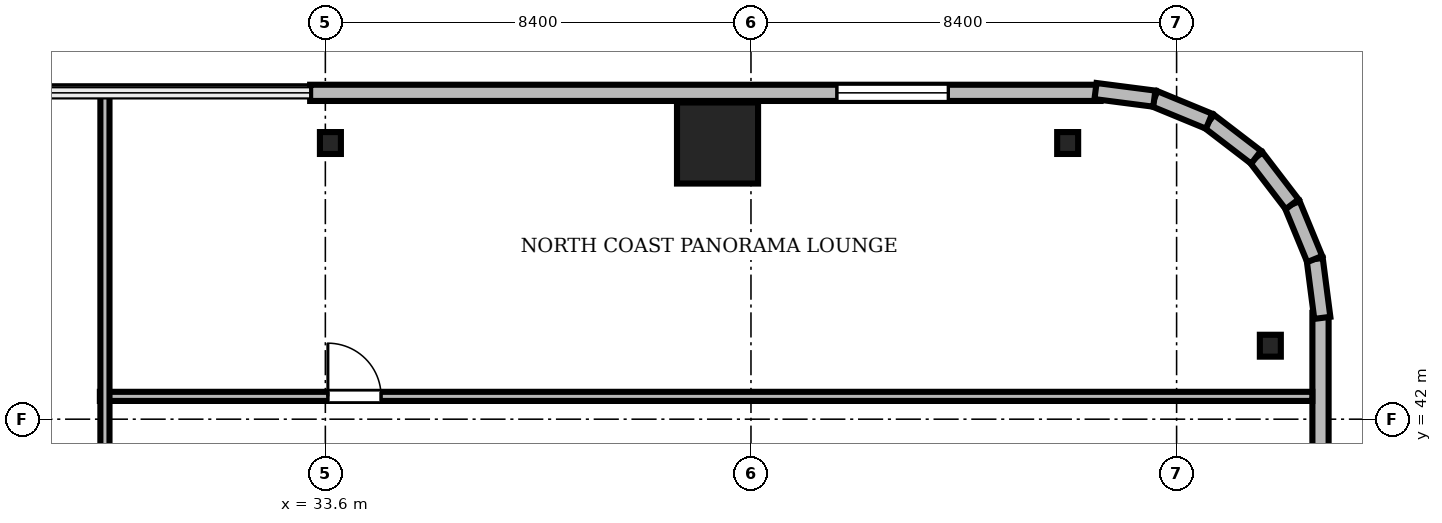
"""IFC4 building model, lengths in metres.
Left out: names, types, materials, properties, quantities, classifications, styles, units other than length and angle.
Written with IfcOpenShell. Run it as: python <this file> out.ifc"""

import sys

from ifc_helpers import new_model, si_unit, direction, frame, frame_2d, origin, origin_2d, place, context, subcontext, project, spatial, rectangle, i_section, extrude, source, transform, mapped, element, fill, save


model = new_model("IFC4")
c1 = context("Model", 3, precision=1e-05, world=origin(), true_north=direction((0.0, 1.0)))
c2 = subcontext(c1, "Body", "Model", "MODEL_VIEW")
j1 = project(units=[si_unit("LENGTHUNIT", "METRE"), si_unit("PLANEANGLEUNIT", "RADIAN")], contexts=[c1])
p1 = place(None, origin())
s1 = spatial("IfcSite", under=j1, at=p1, CompositionType="ELEMENT")
p2 = place(p1, origin())
s2 = spatial("IfcBuilding", under=s1, at=p2, CompositionType="ELEMENT")
p3 = place(p2, frame((0.0, 0.0, 129.8)))
s3 = spatial("IfcBuildingStorey", under=s2, at=p3, CompositionType="ELEMENT", Elevation=129.8)
m1 = source(origin(), c2, "Body", "SweptSolid", [
    extrude(rectangle(XDim=1.6, YDim=1.6, at=origin_2d()), origin(), (0.0, 0.0, 1.0), 3.46),
])
p4 = place(p3, frame((41.34, 47.45, 0.0), z_axis=(0.0, 0.0, 1.0), x_axis=(1.0, 0.0, 0.0)))
e1 = element("IfcColumn", 1, at=p4, inside=s3, PredefinedType="COLUMN", context=c2, shape_type="MappedRepresentation", body=[
    mapped(m1, transform((0.0, 0.0, 0.0), scale=1.0)),
])
m2 = source(origin(), c2, "Body", "SweptSolid", [
    extrude(i_section(OverallWidth=0.414, OverallDepth=0.432, WebThickness=0.026, FlangeThickness=0.04, FilletRadius=0.015, at=origin_2d()), origin(), (0.0, 0.0, 1.0), 3.46),
])
for number, where, z_axis, x_axis in (
    (2, (52.25, 43.45, 0.0), (0.0, 0.0, 1.0), (1.0, 0.0, 0.0)),
    (3, (48.25, 47.45, 0.0), (0.0, 0.0, 1.0), (1.0, 0.0, 0.0)),
    (4, (33.7, 47.45, 0.0), (0.0, 0.0, 1.0), (1.0, 0.0, 0.0)),
):
    element("IfcColumn", number, at=place(p3, frame(where, z_axis=z_axis, x_axis=x_axis)), inside=s3, PredefinedType="COLUMN", context=c2, shape_type="MappedRepresentation", body=[
        mapped(m2, transform((0.0, 0.0, 0.0), scale=1.0)),
    ])
m3 = source(origin(), c2, "Body", "SweptSolid", [
    extrude(rectangle(XDim=15.6, YDim=0.32, at=frame_2d((7.8, 0.0))), origin(), (0.0, 0.0, 1.0), 3.46),
])
p5 = place(p3, frame((48.9, 48.44, 0.0), z_axis=(0.0, 0.0, 1.0), x_axis=(-1.0, 0.0, 0.0)))
e5 = element("IfcWall", 5, at=p5, inside=s3, PredefinedType="SOLIDWALL", context=c2, shape_type="MappedRepresentation", body=[
    mapped(m3, transform((0.0, 0.0, 0.0), scale=1.0)),
])
m4 = source(origin(), c2, "Body", "SweptSolid", [
    extrude(rectangle(XDim=2.2, YDim=2.4, at=frame_2d((1.1, 1.2))), frame((0.0, 0.17, 0.0), z_axis=(0.0, -1.0, 0.0), x_axis=(1.0, 0.0, 0.0)), (0.0, 0.0, 1.0), 0.34),
])
p6 = place(p5, frame((3.005, 0.0, 0.72)))
e6 = element("IfcOpeningElement", 6, at=p6, cuts=e5, PredefinedType="OPENING", context=c2, shape_type="MappedRepresentation", body=[
    mapped(m4, transform((0.0, 0.0, 0.0), scale=1.0)),
])
m5 = source(origin(), c2, "Body", "SweptSolid", [
    extrude(rectangle(XDim=15.6, YDim=0.32, at=frame_2d((7.8, 0.0))), origin(), (0.0, 0.0, 1.0), 3.46),
])
p7 = place(p3, frame((53.24, 28.5, 0.0), z_axis=(0.0, 0.0, 1.0), x_axis=(0.0, 1.0, 0.0)))
e7 = element("IfcWall", 7, at=p7, inside=s3, PredefinedType="SOLIDWALL", context=c2, shape_type="MappedRepresentation", body=[
    mapped(m5, transform((0.0, 0.0, 0.0), scale=1.0)),
])
p8 = place(p7, frame((10.395, 0.0, 0.72)))
e8 = element("IfcOpeningElement", 8, at=p8, cuts=e7, PredefinedType="OPENING", context=c2, shape_type="MappedRepresentation", body=[
    mapped(m4, transform((0.0, 0.0, 0.0), scale=1.0)),
])
m6 = source(origin(), c2, "Body", "SweptSolid", [
    extrude(rectangle(XDim=1.17, YDim=0.32, at=frame_2d((0.585, 0.0))), origin(), (0.0, 0.0, 1.0), 3.46),
])
p9 = place(p3, frame((53.276, 44.0, 0.0), z_axis=(0.0, 0.0, 1.0), x_axis=(-0.128295670475, 0.991735963317, 0.0)))
e9 = element("IfcWall", 9, at=p9, inside=s3, PredefinedType="SOLIDWALL", context=c2, shape_type="MappedRepresentation", body=[
    mapped(m6, transform((0.0, 0.0, 0.0), scale=1.0)),
])
m7 = source(origin(), c2, "Body", "SweptSolid", [
    extrude(rectangle(XDim=1.169, YDim=0.32, at=frame_2d((0.584, 0.0))), origin(), (0.0, 0.0, 1.0), 3.46),
])
p10 = place(p3, frame((53.125, 45.16, 0.0), z_axis=(0.0, 0.0, 1.0), x_axis=(-0.381054331552, 0.924552646638, 0.0)))
e10 = element("IfcWall", 10, at=p10, inside=s3, PredefinedType="SOLIDWALL", context=c2, shape_type="MappedRepresentation", body=[
    mapped(m7, transform((0.0, 0.0, 0.0), scale=1.0)),
])
m8 = source(origin(), c2, "Body", "SweptSolid", [
    extrude(rectangle(XDim=1.169, YDim=0.32, at=frame_2d((0.584, 0.0))), origin(), (0.0, 0.0, 1.0), 3.46),
])
p11 = place(p3, frame((52.68, 46.241, 0.0), z_axis=(0.0, 0.0, 1.0), x_axis=(-0.608387696831, 0.793639975269, 0.0)))
e11 = element("IfcWall", 11, at=p11, inside=s3, PredefinedType="SOLIDWALL", context=c2, shape_type="MappedRepresentation", body=[
    mapped(m8, transform((0.0, 0.0, 0.0), scale=1.0)),
])
m9 = source(origin(), c2, "Body", "SweptSolid", [
    extrude(rectangle(XDim=1.169, YDim=0.32, at=frame_2d((0.584, 0.0))), origin(), (0.0, 0.0, 1.0), 3.46),
])
p12 = place(p3, frame((51.969, 47.169, 0.0), z_axis=(0.0, 0.0, 1.0), x_axis=(-0.793663520347, 0.608356981114, 0.0)))
e12 = element("IfcWall", 12, at=p12, inside=s3, PredefinedType="SOLIDWALL", context=c2, shape_type="MappedRepresentation", body=[
    mapped(m9, transform((0.0, 0.0, 0.0), scale=1.0)),
])
p13 = place(p3, frame((51.041, 47.88, 0.0), z_axis=(0.0, 0.0, 1.0), x_axis=(-0.924552646638, 0.381054331552, 0.0)))
e13 = element("IfcWall", 13, at=p13, inside=s3, PredefinedType="SOLIDWALL", context=c2, shape_type="MappedRepresentation", body=[
    mapped(m7, transform((0.0, 0.0, 0.0), scale=1.0)),
])
p14 = place(p3, frame((49.96, 48.325, 0.0), z_axis=(0.0, 0.0, 1.0), x_axis=(-0.991735963317, 0.128295670475, 0.0)))
e14 = element("IfcWall", 14, at=p14, inside=s3, PredefinedType="SOLIDWALL", context=c2, shape_type="MappedRepresentation", body=[
    mapped(m6, transform((0.0, 0.0, 0.0), scale=1.0)),
])
m10 = source(origin(), c2, "Body", "SweptSolid", [
    extrude(rectangle(XDim=23.928, YDim=0.18, at=frame_2d((11.964, 0.0))), origin(), (0.0, 0.0, 1.0), 2.702),
])
p15 = place(p3, frame((29.15, 42.45, 0.0), z_axis=(0.0, 0.0, 1.0), x_axis=(1.0, 0.0, 0.0)))
e15 = element("IfcWall", 15, at=p15, inside=s3, PredefinedType="PARTITIONING", context=c2, shape_type="MappedRepresentation", body=[
    mapped(m10, transform((0.0, 0.0, 0.0), scale=1.0)),
])
m11 = source(origin(), c2, "Body", "SweptSolid", [
    extrude(rectangle(XDim=1.05, YDim=2.2, at=frame_2d((0.525, 1.1))), frame((0.0, 0.1, 0.0), z_axis=(0.0, -1.0, 0.0), x_axis=(1.0, 0.0, 0.0)), (0.0, 0.0, 1.0), 0.2),
])
p16 = place(p15, frame((4.5, 0.0, 0.0)))
e16 = element("IfcOpeningElement", 16, at=p16, cuts=e15, PredefinedType="OPENING", context=c2, shape_type="MappedRepresentation", body=[
    mapped(m11, transform((0.0, 0.0, 0.0), scale=1.0)),
])
m12 = source(origin(), c2, "Body", "SweptSolid", [
    extrude(rectangle(XDim=11.45, YDim=0.18, at=frame_2d((5.725, 0.0))), origin(), (0.0, 0.0, 1.0), 2.702),
])
p17 = place(p3, frame((29.25, 37.02, 0.0), z_axis=(0.0, 0.0, 1.0), x_axis=(0.0, 1.0, 0.0)))
e17 = element("IfcWall", 17, at=p17, inside=s3, PredefinedType="PARTITIONING", context=c2, shape_type="MappedRepresentation", body=[
    mapped(m12, transform((0.0, 0.0, 0.0), scale=1.0)),
])
m13 = source(origin(), c2, "Body", "SweptSolid", [
    extrude(rectangle(XDim=2.2, YDim=2.4, at=frame_2d((1.1, 1.2))), frame((0.0, 0.03, 0.0), z_axis=(0.0, -1.0, 0.0), x_axis=(1.0, 0.0, 0.0)), (0.0, 0.0, 1.0), 0.06),
])
p18 = place(p6, origin())
e18 = element("IfcWindow", 18, at=p18, inside=s3, PartitioningType="SINGLE_PANEL", PredefinedType="WINDOW", context=c2, shape_type="MappedRepresentation", body=[
    mapped(m13, transform((0.0, 0.0, 0.0), scale=1.0)),
])
fill(e6, e18)
m14 = source(origin(), c2, "Body", "SweptSolid", [
    extrude(rectangle(XDim=1.05, YDim=2.2, at=frame_2d((0.525, 1.1))), frame((0.0, 0.025, 0.0), z_axis=(0.0, -1.0, 0.0), x_axis=(1.0, 0.0, 0.0)), (0.0, 0.0, 1.0), 0.05),
])
p19 = place(p16, origin())
e19 = element("IfcDoor", 19, at=p19, inside=s3, OperationType="SINGLE_SWING_LEFT", PredefinedType="DOOR", context=c2, shape_type="MappedRepresentation", body=[
    mapped(m14, transform((0.0, 0.0, 0.0), scale=1.0)),
])
fill(e16, e19)
save(model, sys.argv[1])
